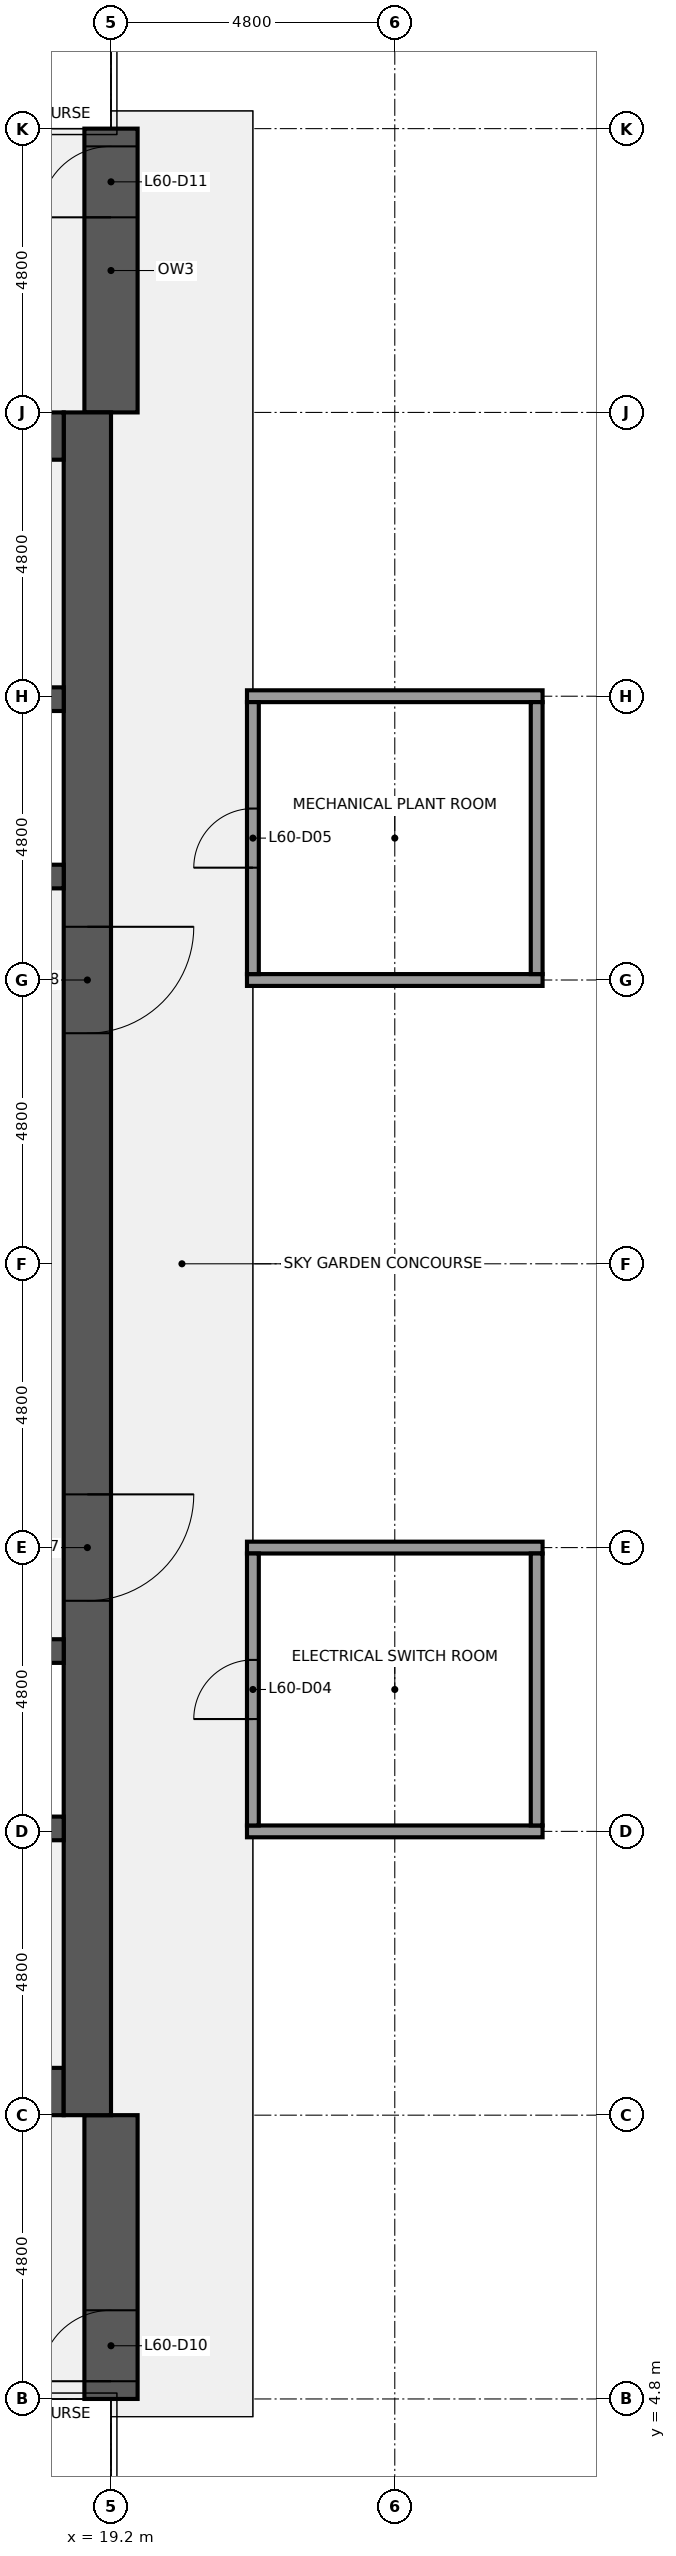
"""IFC4 building model, lengths in metres.
Left out: names, types, materials, properties, quantities, classifications, styles, units other than length and angle.
Written with IfcOpenShell. Run it as: python <this file> out.ifc"""

import sys

from ifc_helpers import new_model, si_unit, direction, frame, frame_2d, origin, place, context, subcontext, project, spatial, rectangle, extrude, element, fill, save


model = new_model("IFC4")
c1 = context("Model", 3, precision=1e-05, world=origin(), true_north=direction((0.0, 1.0)))
c2 = subcontext(c1, "Body", "Model", "MODEL_VIEW")
j1 = project(units=[si_unit("LENGTHUNIT", "METRE"), si_unit("PLANEANGLEUNIT", "RADIAN")], contexts=[c1])
p1 = place(None, origin())
s1 = spatial("IfcSite", under=j1, at=p1, CompositionType="ELEMENT")
p2 = place(p1, origin())
s2 = spatial("IfcBuilding", under=s1, at=p2, CompositionType="ELEMENT")
p3 = place(p2, frame((0.0, 0.0, 269.7)))
s3 = spatial("IfcBuildingStorey", under=s2, at=p3, CompositionType="ELEMENT", Elevation=269.7)
p4 = place(p3, frame((19.2, 4.8, 0.0), z_axis=(0.0, 0.0, 1.0), x_axis=(0.0, 1.0, 0.0)))
e1 = element("IfcWall", 1, at=p4, inside=s3, PredefinedType="SHEAR", context=c2, shape_type="SweptSolid", body=[
    extrude(rectangle(XDim=4.8, YDim=0.9, at=frame_2d((2.4, 0.0))), origin(), (0.0, 0.0, 1.0), 12.3),
])
p5 = place(p4, frame((0.3, 0.0, 0.0)))
e2 = element("IfcOpeningElement", 2, at=p5, cuts=e1, PredefinedType="OPENING", context=c2, shape_type="SweptSolid", body=[
    extrude(rectangle(XDim=1.2, YDim=2.1, at=frame_2d((0.6, 1.05))), frame((0.0, 0.46, 0.0), z_axis=(0.0, -1.0, 0.0), x_axis=(1.0, 0.0, 0.0)), (0.0, 0.0, 1.0), 0.92),
])
p6 = place(p3, frame((19.2, 38.4, 0.0), z_axis=(0.0, 0.0, 1.0), x_axis=(0.0, 1.0, 0.0)))
e3 = element("IfcWall", 3, at=p6, inside=s3, PredefinedType="SHEAR", context=c2, shape_type="SweptSolid", body=[
    extrude(rectangle(XDim=4.8, YDim=0.9, at=frame_2d((2.4, 0.0))), origin(), (0.0, 0.0, 1.0), 12.3),
])
p7 = place(p6, frame((3.3, 0.0, 0.0)))
e4 = element("IfcOpeningElement", 4, at=p7, cuts=e3, PredefinedType="OPENING", context=c2, shape_type="SweptSolid", body=[
    extrude(rectangle(XDim=1.2, YDim=2.1, at=frame_2d((0.6, 1.05))), frame((0.0, 0.46, 0.0), z_axis=(0.0, -1.0, 0.0), x_axis=(1.0, 0.0, 0.0)), (0.0, 0.0, 1.0), 0.92),
])
p8 = place(p3, frame((18.4, 10.0, 0.0), z_axis=(0.0, 0.0, 1.0), x_axis=(-1.0, 0.0, 0.0)))
e5 = element("IfcWall", 5, at=p8, inside=s3, PredefinedType="SHEAR", context=c2, shape_type="SweptSolid", body=[
    extrude(rectangle(XDim=17.6, YDim=0.8, at=frame_2d((8.8, 0.0))), origin(), (0.0, 0.0, 1.0), 12.3),
])
p9 = place(p8, frame((1.05, 0.0, 0.0)))
e6 = element("IfcOpeningElement", 6, at=p9, cuts=e5, PredefinedType="OPENING", context=c2, shape_type="SweptSolid", body=[
    extrude(rectangle(XDim=1.1, YDim=2.1, at=frame_2d((0.55, 1.05))), frame((0.0, 0.41, 0.0), z_axis=(0.0, -1.0, 0.0), x_axis=(1.0, 0.0, 0.0)), (0.0, 0.0, 1.0), 0.82),
])
p10 = place(p8, frame((10.3, 0.0, 0.9)))
e7 = element("IfcOpeningElement", 7, at=p10, cuts=e5, PredefinedType="OPENING", context=c2, shape_type="SweptSolid", body=[
    extrude(rectangle(XDim=1.8, YDim=1.5, at=frame_2d((0.9, 0.75))), frame((0.0, 0.41, 0.0), z_axis=(0.0, -1.0, 0.0), x_axis=(1.0, 0.0, 0.0)), (0.0, 0.0, 1.0), 0.82),
])
p11 = place(p8, frame((5.5, 0.0, 0.9)))
e8 = element("IfcOpeningElement", 8, at=p11, cuts=e5, PredefinedType="OPENING", context=c2, shape_type="SweptSolid", body=[
    extrude(rectangle(XDim=1.8, YDim=1.5, at=frame_2d((0.9, 0.75))), frame((0.0, 0.41, 0.0), z_axis=(0.0, -1.0, 0.0), x_axis=(1.0, 0.0, 0.0)), (0.0, 0.0, 1.0), 0.82),
])
p12 = place(p3, frame((18.8, 38.4, 0.0), z_axis=(0.0, 0.0, 1.0), x_axis=(0.0, -1.0, 0.0)))
e9 = element("IfcWall", 9, at=p12, inside=s3, PredefinedType="SHEAR", context=c2, shape_type="SweptSolid", body=[
    extrude(rectangle(XDim=28.8, YDim=0.8, at=frame_2d((14.4, 0.0))), origin(), (0.0, 0.0, 1.0), 12.3),
])
p13 = place(p12, frame((18.3, 0.0, 0.0)))
e10 = element("IfcOpeningElement", 10, at=p13, cuts=e9, PredefinedType="OPENING", context=c2, shape_type="SweptSolid", body=[
    extrude(rectangle(XDim=1.8, YDim=2.1, at=frame_2d((0.9, 1.05))), frame((0.0, 0.41, 0.0), z_axis=(0.0, -1.0, 0.0), x_axis=(1.0, 0.0, 0.0)), (0.0, 0.0, 1.0), 0.82),
])
p14 = place(p12, frame((8.7, 0.0, 0.0)))
e11 = element("IfcOpeningElement", 11, at=p14, cuts=e9, PredefinedType="OPENING", context=c2, shape_type="SweptSolid", body=[
    extrude(rectangle(XDim=1.8, YDim=2.1, at=frame_2d((0.9, 1.05))), frame((0.0, 0.41, 0.0), z_axis=(0.0, -1.0, 0.0), x_axis=(1.0, 0.0, 0.0)), (0.0, 0.0, 1.0), 0.82),
])
p15 = place(p3, frame((0.8, 14.45, 0.0), z_axis=(0.0, 0.0, 1.0), x_axis=(1.0, 0.0, 0.0)))
e12 = element("IfcWall", 12, at=p15, inside=s3, PredefinedType="SHEAR", context=c2, shape_type="SweptSolid", body=[
    extrude(rectangle(XDim=17.6, YDim=0.4, at=frame_2d((8.8, 0.0))), origin(), (0.0, 0.0, 1.0), 12.3),
])
p16 = place(p3, frame((0.8, 17.45, 0.0), z_axis=(0.0, 0.0, 1.0), x_axis=(1.0, 0.0, 0.0)))
e13 = element("IfcWall", 13, at=p16, inside=s3, PredefinedType="SHEAR", context=c2, shape_type="SweptSolid", body=[
    extrude(rectangle(XDim=17.6, YDim=0.4, at=frame_2d((8.8, 0.0))), origin(), (0.0, 0.0, 1.0), 12.3),
])
p17 = place(p16, frame((1.762, 0.0, 0.0)))
e14 = element("IfcOpeningElement", 14, at=p17, cuts=e13, PredefinedType="OPENING", context=c2, shape_type="SweptSolid", body=[
    extrude(rectangle(XDim=1.0, YDim=2.1, at=frame_2d((0.5, 1.05))), frame((0.0, 0.21, 0.0), z_axis=(0.0, -1.0, 0.0), x_axis=(1.0, 0.0, 0.0)), (0.0, 0.0, 1.0), 0.42),
])
p18 = place(p16, frame((5.3, 0.0, 0.0)))
e15 = element("IfcOpeningElement", 15, at=p18, cuts=e13, PredefinedType="OPENING", context=c2, shape_type="SweptSolid", body=[
    extrude(rectangle(XDim=1.0, YDim=2.1, at=frame_2d((0.5, 1.05))), frame((0.0, 0.21, 0.0), z_axis=(0.0, -1.0, 0.0), x_axis=(1.0, 0.0, 0.0)), (0.0, 0.0, 1.0), 0.42),
])
p19 = place(p16, frame((9.5, 0.0, 0.0)))
e16 = element("IfcOpeningElement", 16, at=p19, cuts=e13, PredefinedType="OPENING", context=c2, shape_type="SweptSolid", body=[
    extrude(rectangle(XDim=1.0, YDim=2.1, at=frame_2d((0.5, 1.05))), frame((0.0, 0.21, 0.0), z_axis=(0.0, -1.0, 0.0), x_axis=(1.0, 0.0, 0.0)), (0.0, 0.0, 1.0), 0.42),
])
p20 = place(p16, frame((14.837, 0.0, 0.0)))
e17 = element("IfcOpeningElement", 17, at=p20, cuts=e13, PredefinedType="OPENING", context=c2, shape_type="SweptSolid", body=[
    extrude(rectangle(XDim=1.0, YDim=2.1, at=frame_2d((0.5, 1.05))), frame((0.0, 0.21, 0.0), z_axis=(0.0, -1.0, 0.0), x_axis=(1.0, 0.0, 0.0)), (0.0, 0.0, 1.0), 0.42),
])
p21 = place(p3, frame((0.8, 30.55, 0.0), z_axis=(0.0, 0.0, 1.0), x_axis=(1.0, 0.0, 0.0)))
e18 = element("IfcWall", 18, at=p21, inside=s3, PredefinedType="SHEAR", context=c2, shape_type="SweptSolid", body=[
    extrude(rectangle(XDim=17.6, YDim=0.4, at=frame_2d((8.8, 0.0))), origin(), (0.0, 0.0, 1.0), 12.3),
])
p22 = place(p21, frame((1.4, 0.0, 0.0)))
e19 = element("IfcOpeningElement", 19, at=p22, cuts=e18, PredefinedType="OPENING", context=c2, shape_type="SweptSolid", body=[
    extrude(rectangle(XDim=1.2, YDim=2.1, at=frame_2d((0.6, 1.05))), frame((0.0, 0.21, 0.0), z_axis=(0.0, -1.0, 0.0), x_axis=(1.0, 0.0, 0.0)), (0.0, 0.0, 1.0), 0.42),
])
p23 = place(p21, frame((4.0, 0.0, 0.0)))
e20 = element("IfcOpeningElement", 20, at=p23, cuts=e18, PredefinedType="OPENING", context=c2, shape_type="SweptSolid", body=[
    extrude(rectangle(XDim=1.2, YDim=2.1, at=frame_2d((0.6, 1.05))), frame((0.0, 0.21, 0.0), z_axis=(0.0, -1.0, 0.0), x_axis=(1.0, 0.0, 0.0)), (0.0, 0.0, 1.0), 0.42),
])
p24 = place(p21, frame((6.6, 0.0, 0.0)))
e21 = element("IfcOpeningElement", 21, at=p24, cuts=e18, PredefinedType="OPENING", context=c2, shape_type="SweptSolid", body=[
    extrude(rectangle(XDim=1.2, YDim=2.1, at=frame_2d((0.6, 1.05))), frame((0.0, 0.21, 0.0), z_axis=(0.0, -1.0, 0.0), x_axis=(1.0, 0.0, 0.0)), (0.0, 0.0, 1.0), 0.42),
])
p25 = place(p21, frame((9.8, 0.0, 0.0)))
e22 = element("IfcOpeningElement", 22, at=p25, cuts=e18, PredefinedType="OPENING", context=c2, shape_type="SweptSolid", body=[
    extrude(rectangle(XDim=1.2, YDim=2.1, at=frame_2d((0.6, 1.05))), frame((0.0, 0.21, 0.0), z_axis=(0.0, -1.0, 0.0), x_axis=(1.0, 0.0, 0.0)), (0.0, 0.0, 1.0), 0.42),
])
p26 = place(p21, frame((12.4, 0.0, 0.0)))
e23 = element("IfcOpeningElement", 23, at=p26, cuts=e18, PredefinedType="OPENING", context=c2, shape_type="SweptSolid", body=[
    extrude(rectangle(XDim=1.2, YDim=2.1, at=frame_2d((0.6, 1.05))), frame((0.0, 0.21, 0.0), z_axis=(0.0, -1.0, 0.0), x_axis=(1.0, 0.0, 0.0)), (0.0, 0.0, 1.0), 0.42),
])
p27 = place(p21, frame((15.0, 0.0, 0.0)))
e24 = element("IfcOpeningElement", 24, at=p27, cuts=e18, PredefinedType="OPENING", context=c2, shape_type="SweptSolid", body=[
    extrude(rectangle(XDim=1.2, YDim=2.1, at=frame_2d((0.6, 1.05))), frame((0.0, 0.21, 0.0), z_axis=(0.0, -1.0, 0.0), x_axis=(1.0, 0.0, 0.0)), (0.0, 0.0, 1.0), 0.42),
])
p28 = place(p3, frame((0.8, 33.55, 0.0), z_axis=(0.0, 0.0, 1.0), x_axis=(1.0, 0.0, 0.0)))
e25 = element("IfcWall", 25, at=p28, inside=s3, PredefinedType="SHEAR", context=c2, shape_type="SweptSolid", body=[
    extrude(rectangle(XDim=17.6, YDim=0.4, at=frame_2d((8.8, 0.0))), origin(), (0.0, 0.0, 1.0), 12.3),
])
p29 = place(p3, frame((0.8, 38.0, 0.0), z_axis=(0.0, 0.0, 1.0), x_axis=(1.0, 0.0, 0.0)))
e26 = element("IfcWall", 26, at=p29, inside=s3, PredefinedType="SHEAR", context=c2, shape_type="SweptSolid", body=[
    extrude(rectangle(XDim=17.6, YDim=0.8, at=frame_2d((8.8, 0.0))), origin(), (0.0, 0.0, 1.0), 12.3),
])
p30 = place(p29, frame((15.45, 0.0, 0.0)))
e27 = element("IfcOpeningElement", 27, at=p30, cuts=e26, PredefinedType="OPENING", context=c2, shape_type="SweptSolid", body=[
    extrude(rectangle(XDim=1.1, YDim=2.1, at=frame_2d((0.55, 1.05))), frame((0.0, 0.41, 0.0), z_axis=(0.0, -1.0, 0.0), x_axis=(1.0, 0.0, 0.0)), (0.0, 0.0, 1.0), 0.82),
])
p31 = place(p29, frame((5.5, 0.0, 0.9)))
e28 = element("IfcOpeningElement", 28, at=p31, cuts=e26, PredefinedType="OPENING", context=c2, shape_type="SweptSolid", body=[
    extrude(rectangle(XDim=1.8, YDim=1.5, at=frame_2d((0.9, 0.75))), frame((0.0, 0.41, 0.0), z_axis=(0.0, -1.0, 0.0), x_axis=(1.0, 0.0, 0.0)), (0.0, 0.0, 1.0), 0.82),
])
p32 = place(p29, frame((10.3, 0.0, 0.9)))
e29 = element("IfcOpeningElement", 29, at=p32, cuts=e26, PredefinedType="OPENING", context=c2, shape_type="SweptSolid", body=[
    extrude(rectangle(XDim=1.8, YDim=1.5, at=frame_2d((0.9, 0.75))), frame((0.0, 0.41, 0.0), z_axis=(0.0, -1.0, 0.0), x_axis=(1.0, 0.0, 0.0)), (0.0, 0.0, 1.0), 0.82),
])
for number, where, z_axis, x_axis in (
    (30, (21.5, 14.4, 0.0), (0.0, 0.0, 1.0), (1.0, 0.0, 0.0)),
    (31, (21.5, 19.2, 0.0), (0.0, 0.0, 1.0), (1.0, 0.0, 0.0)),
    (32, (21.5, 28.8, 0.0), (0.0, 0.0, 1.0), (1.0, 0.0, 0.0)),
    (33, (21.5, 33.6, 0.0), (0.0, 0.0, 1.0), (1.0, 0.0, 0.0)),
):
    element("IfcWall", number, at=place(p3, frame(where, z_axis=z_axis, x_axis=x_axis)), inside=s3, PredefinedType="PARTITIONING", context=c2, shape_type="SweptSolid", body=[
        extrude(rectangle(XDim=5.0, YDim=0.2, at=frame_2d((2.5, 0.0))), origin(), (0.0, 0.0, 1.0), 11.31),
    ])
p33 = place(p3, frame((21.6, 14.5, 0.0), z_axis=(0.0, 0.0, 1.0), x_axis=(0.0, 1.0, 0.0)))
e34 = element("IfcWall", 34, at=p33, inside=s3, PredefinedType="PARTITIONING", context=c2, shape_type="SweptSolid", body=[
    extrude(rectangle(XDim=4.6, YDim=0.2, at=frame_2d((2.3, 0.0))), origin(), (0.0, 0.0, 1.0), 11.31),
])
p34 = place(p33, frame((1.8, 0.0, 0.0)))
e35 = element("IfcOpeningElement", 35, at=p34, cuts=e34, PredefinedType="OPENING", context=c2, shape_type="SweptSolid", body=[
    extrude(rectangle(XDim=1.0, YDim=2.1, at=frame_2d((0.5, 1.05))), frame((0.0, 0.11, 0.0), z_axis=(0.0, -1.0, 0.0), x_axis=(1.0, 0.0, 0.0)), (0.0, 0.0, 1.0), 0.22),
])
p35 = place(p3, frame((21.6, 28.9, 0.0), z_axis=(0.0, 0.0, 1.0), x_axis=(0.0, 1.0, 0.0)))
e36 = element("IfcWall", 36, at=p35, inside=s3, PredefinedType="PARTITIONING", context=c2, shape_type="SweptSolid", body=[
    extrude(rectangle(XDim=4.6, YDim=0.2, at=frame_2d((2.3, 0.0))), origin(), (0.0, 0.0, 1.0), 11.31),
])
p36 = place(p35, frame((1.8, 0.0, 0.0)))
e37 = element("IfcOpeningElement", 37, at=p36, cuts=e36, PredefinedType="OPENING", context=c2, shape_type="SweptSolid", body=[
    extrude(rectangle(XDim=1.0, YDim=2.1, at=frame_2d((0.5, 1.05))), frame((0.0, 0.11, 0.0), z_axis=(0.0, -1.0, 0.0), x_axis=(1.0, 0.0, 0.0)), (0.0, 0.0, 1.0), 0.22),
])
for number, where, z_axis, x_axis in (
    (38, (26.4, 14.5, 0.0), (0.0, 0.0, 1.0), (0.0, 1.0, 0.0)),
    (39, (26.4, 28.9, 0.0), (0.0, 0.0, 1.0), (0.0, 1.0, 0.0)),
):
    element("IfcWall", number, at=place(p3, frame(where, z_axis=z_axis, x_axis=x_axis)), inside=s3, PredefinedType="PARTITIONING", context=c2, shape_type="SweptSolid", body=[
        extrude(rectangle(XDim=4.6, YDim=0.2, at=frame_2d((2.3, 0.0))), origin(), (0.0, 0.0, 1.0), 11.31),
    ])
p37 = place(p13, origin())
e40 = element("IfcDoor", 40, at=p37, inside=s3, OperationType="DOUBLE_DOOR_SINGLE_SWING", PredefinedType="DOOR", context=c2, shape_type="SweptSolid", body=[
    extrude(rectangle(XDim=1.8, YDim=2.1, at=frame_2d((0.9, 1.05))), frame((0.0, 0.025, 0.0), z_axis=(0.0, -1.0, 0.0), x_axis=(1.0, 0.0, 0.0)), (0.0, 0.0, 1.0), 0.05),
])
fill(e10, e40)
p38 = place(p14, origin())
e41 = element("IfcDoor", 41, at=p38, inside=s3, OperationType="DOUBLE_DOOR_SINGLE_SWING", PredefinedType="DOOR", context=c2, shape_type="SweptSolid", body=[
    extrude(rectangle(XDim=1.8, YDim=2.1, at=frame_2d((0.9, 1.05))), frame((0.0, 0.025, 0.0), z_axis=(0.0, -1.0, 0.0), x_axis=(1.0, 0.0, 0.0)), (0.0, 0.0, 1.0), 0.05),
])
fill(e11, e41)
p39 = place(p34, origin())
e42 = element("IfcDoor", 42, at=p39, inside=s3, OperationType="SINGLE_SWING_LEFT", PredefinedType="DOOR", context=c2, shape_type="SweptSolid", body=[
    extrude(rectangle(XDim=1.0, YDim=2.1, at=frame_2d((0.5, 1.05))), frame((0.0, 0.025, 0.0), z_axis=(0.0, -1.0, 0.0), x_axis=(1.0, 0.0, 0.0)), (0.0, 0.0, 1.0), 0.05),
])
fill(e35, e42)
p40 = place(p36, origin())
e43 = element("IfcDoor", 43, at=p40, inside=s3, OperationType="SINGLE_SWING_LEFT", PredefinedType="DOOR", context=c2, shape_type="SweptSolid", body=[
    extrude(rectangle(XDim=1.0, YDim=2.1, at=frame_2d((0.5, 1.05))), frame((0.0, 0.025, 0.0), z_axis=(0.0, -1.0, 0.0), x_axis=(1.0, 0.0, 0.0)), (0.0, 0.0, 1.0), 0.05),
])
fill(e37, e43)
p41 = place(p5, origin())
e44 = element("IfcDoor", 44, at=p41, inside=s3, OperationType="SINGLE_SWING_LEFT", PredefinedType="DOOR", context=c2, shape_type="SweptSolid", body=[
    extrude(rectangle(XDim=1.2, YDim=2.1, at=frame_2d((0.6, 1.05))), frame((0.0, 0.025, 0.0), z_axis=(0.0, -1.0, 0.0), x_axis=(1.0, 0.0, 0.0)), (0.0, 0.0, 1.0), 0.05),
])
fill(e2, e44)
p42 = place(p7, origin())
e45 = element("IfcDoor", 45, at=p42, inside=s3, OperationType="SINGLE_SWING_LEFT", PredefinedType="DOOR", context=c2, shape_type="SweptSolid", body=[
    extrude(rectangle(XDim=1.2, YDim=2.1, at=frame_2d((0.6, 1.05))), frame((0.0, 0.025, 0.0), z_axis=(0.0, -1.0, 0.0), x_axis=(1.0, 0.0, 0.0)), (0.0, 0.0, 1.0), 0.05),
])
fill(e4, e45)
save(model, sys.argv[1])
